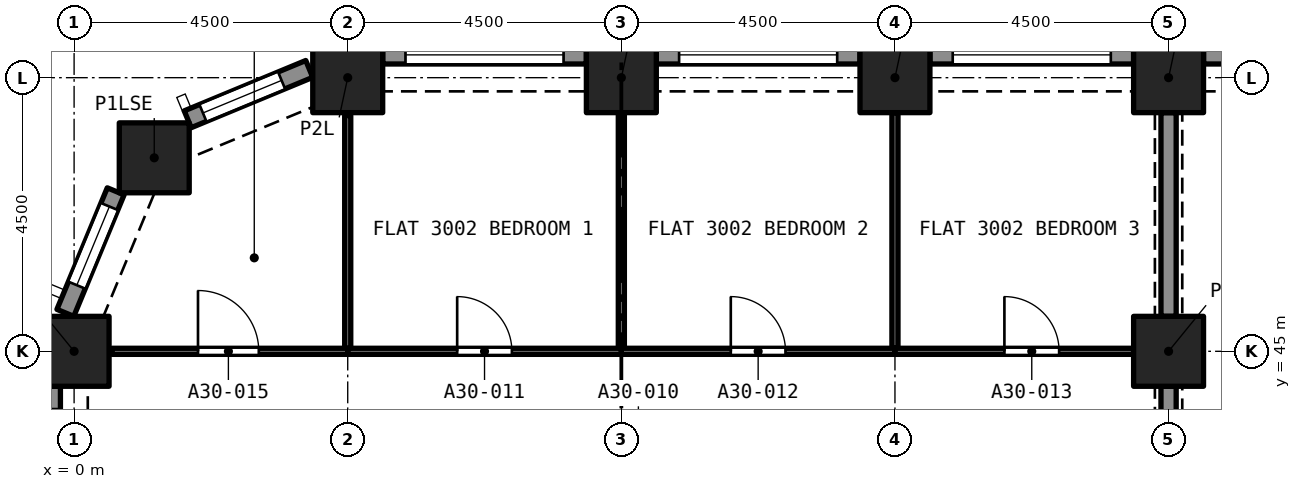
"""IFC4 building model, lengths in metres.
Left out: names, types, materials, properties, quantities, classifications, styles, units other than length and angle.
Written with IfcOpenShell. Run it as: python <this file> out.ifc"""

import sys

from ifc_helpers import new_model, si_unit, direction, frame, frame_2d, origin, origin_2d, place, context, subcontext, project, spatial, rectangle, extrude, element, fill, save


model = new_model("IFC4")
c1 = context("Model", 3, precision=1e-05, world=origin(), true_north=direction((0.0, 1.0)))
c2 = subcontext(c1, "Body", "Model", "MODEL_VIEW")
j1 = project(units=[si_unit("LENGTHUNIT", "METRE"), si_unit("PLANEANGLEUNIT", "RADIAN")], contexts=[c1])
p1 = place(None, origin())
s1 = spatial("IfcSite", under=j1, at=p1, CompositionType="ELEMENT")
p2 = place(p1, origin())
s2 = spatial("IfcBuilding", under=s1, at=p2, CompositionType="ELEMENT")
p3 = place(p2, frame((0.0, 0.0, 108.8)))
s3 = spatial("IfcBuildingStorey", under=s2, at=p3, CompositionType="ELEMENT", Elevation=108.8)
for number, where, z_axis, x_axis in (
    (1, (0.0, 45.0, 0.0), (0.0, 0.0, 1.0), (1.0, 0.0, 0.0)),
    (2, (18.0, 45.0, 0.0), (0.0, 0.0, 1.0), (1.0, 0.0, 0.0)),
    (3, (1.318, 48.182, 0.0), (0.0, 0.0, 1.0), (1.0, 0.0, 0.0)),
    (4, (4.5, 49.5, 0.0), (0.0, 0.0, 1.0), (1.0, 0.0, 0.0)),
    (5, (9.0, 49.5, 0.0), (0.0, 0.0, 1.0), (1.0, 0.0, 0.0)),
    (6, (13.5, 49.5, 0.0), (0.0, 0.0, 1.0), (1.0, 0.0, 0.0)),
    (7, (18.0, 49.5, 0.0), (0.0, 0.0, 1.0), (1.0, 0.0, 0.0)),
):
    element("IfcColumn", number, at=place(p3, frame(where, z_axis=z_axis, x_axis=x_axis)), inside=s3, PredefinedType="COLUMN", context=c2, shape_type="SweptSolid", body=[
        extrude(rectangle(XDim=1.15, YDim=1.15, at=origin_2d()), origin(), (0.0, 0.0, 1.0), 3.2),
    ])
p4 = place(p3, frame((18.575, 49.875, 0.0), z_axis=(0.0, 0.0, 1.0), x_axis=(1.0, 0.0, 0.0)))
e8 = element("IfcWall", 8, at=p4, inside=s3, PredefinedType="SOLIDWALL", context=c2, shape_type="SweptSolid", body=[
    extrude(rectangle(XDim=3.35, YDim=0.3, at=frame_2d((1.675, 0.0))), origin(), (0.0, 0.0, 1.0), 3.2),
])
p5 = place(p4, frame((0.375, 0.0, 0.45)))
e9 = element("IfcOpeningElement", 9, at=p5, cuts=e8, PredefinedType="OPENING", context=c2, shape_type="SweptSolid", body=[
    extrude(rectangle(XDim=2.6, YDim=1.95, at=frame_2d((1.3, 0.975))), frame((0.0, 0.16, 0.0), z_axis=(0.0, -1.0, 0.0), x_axis=(1.0, 0.0, 0.0)), (0.0, 0.0, 1.0), 0.32),
])
p6 = place(p3, frame((14.075, 49.875, 0.0), z_axis=(0.0, 0.0, 1.0), x_axis=(1.0, 0.0, 0.0)))
e10 = element("IfcWall", 10, at=p6, inside=s3, PredefinedType="SOLIDWALL", context=c2, shape_type="SweptSolid", body=[
    extrude(rectangle(XDim=3.35, YDim=0.3, at=frame_2d((1.675, 0.0))), origin(), (0.0, 0.0, 1.0), 3.2),
])
p7 = place(p6, frame((0.375, 0.0, 0.45)))
e11 = element("IfcOpeningElement", 11, at=p7, cuts=e10, PredefinedType="OPENING", context=c2, shape_type="SweptSolid", body=[
    extrude(rectangle(XDim=2.6, YDim=1.95, at=frame_2d((1.3, 0.975))), frame((0.0, 0.16, 0.0), z_axis=(0.0, -1.0, 0.0), x_axis=(1.0, 0.0, 0.0)), (0.0, 0.0, 1.0), 0.32),
])
p8 = place(p3, frame((9.575, 49.875, 0.0), z_axis=(0.0, 0.0, 1.0), x_axis=(1.0, 0.0, 0.0)))
e12 = element("IfcWall", 12, at=p8, inside=s3, PredefinedType="SOLIDWALL", context=c2, shape_type="SweptSolid", body=[
    extrude(rectangle(XDim=3.35, YDim=0.3, at=frame_2d((1.675, 0.0))), origin(), (0.0, 0.0, 1.0), 3.2),
])
p9 = place(p8, frame((0.375, 0.0, 0.45)))
e13 = element("IfcOpeningElement", 13, at=p9, cuts=e12, PredefinedType="OPENING", context=c2, shape_type="SweptSolid", body=[
    extrude(rectangle(XDim=2.6, YDim=1.95, at=frame_2d((1.3, 0.975))), frame((0.0, 0.16, 0.0), z_axis=(0.0, -1.0, 0.0), x_axis=(1.0, 0.0, 0.0)), (0.0, 0.0, 1.0), 0.32),
])
p10 = place(p3, frame((5.075, 49.875, 0.0), z_axis=(0.0, 0.0, 1.0), x_axis=(1.0, 0.0, 0.0)))
e14 = element("IfcWall", 14, at=p10, inside=s3, PredefinedType="SOLIDWALL", context=c2, shape_type="SweptSolid", body=[
    extrude(rectangle(XDim=3.35, YDim=0.3, at=frame_2d((1.675, 0.0))), origin(), (0.0, 0.0, 1.0), 3.2),
])
p11 = place(p10, frame((0.375, 0.0, 0.45)))
e15 = element("IfcOpeningElement", 15, at=p11, cuts=e14, PredefinedType="OPENING", context=c2, shape_type="SweptSolid", body=[
    extrude(rectangle(XDim=2.6, YDim=1.95, at=frame_2d((1.3, 0.975))), frame((0.0, 0.16, 0.0), z_axis=(0.0, -1.0, 0.0), x_axis=(1.0, 0.0, 0.0)), (0.0, 0.0, 1.0), 0.32),
])
p12 = place(p3, frame((1.869, 48.816, 0.0), z_axis=(0.0, 0.0, 1.0), x_axis=(0.923862802911, 0.382723818695, 0.0)))
e16 = element("IfcWall", 16, at=p12, inside=s3, PredefinedType="SOLIDWALL", context=c2, shape_type="SweptSolid", body=[
    extrude(rectangle(XDim=2.164, YDim=0.3, at=frame_2d((1.082, 0.0))), origin(), (0.0, 0.0, 1.0), 3.2),
])
p13 = place(p12, frame((0.271, 0.0, 0.45)))
e17 = element("IfcOpeningElement", 17, at=p13, cuts=e16, PredefinedType="OPENING", context=c2, shape_type="SweptSolid", body=[
    extrude(rectangle(XDim=1.4, YDim=1.95, at=frame_2d((0.7, 0.975))), frame((0.0, 0.16, 0.0), z_axis=(0.0, -1.0, 0.0), x_axis=(1.0, 0.0, 0.0)), (0.0, 0.0, 1.0), 0.32),
])
p14 = place(p3, frame((-0.144, 45.632, 0.0), z_axis=(0.0, 0.0, 1.0), x_axis=(0.382723818695, 0.923862802911, 0.0)))
e18 = element("IfcWall", 18, at=p14, inside=s3, PredefinedType="SOLIDWALL", context=c2, shape_type="SweptSolid", body=[
    extrude(rectangle(XDim=2.164, YDim=0.3, at=frame_2d((1.082, 0.0))), origin(), (0.0, 0.0, 1.0), 3.2),
])
p15 = place(p14, frame((0.493, 0.0, 0.45)))
e19 = element("IfcOpeningElement", 19, at=p15, cuts=e18, PredefinedType="OPENING", context=c2, shape_type="SweptSolid", body=[
    extrude(rectangle(XDim=1.4, YDim=1.95, at=frame_2d((0.7, 0.975))), frame((0.0, 0.16, 0.0), z_axis=(0.0, -1.0, 0.0), x_axis=(1.0, 0.0, 0.0)), (0.0, 0.0, 1.0), 0.32),
])
p16 = place(p3, frame((-0.375, 41.075, 0.0), z_axis=(0.0, 0.0, 1.0), x_axis=(0.0, 1.0, 0.0)))
e20 = element("IfcWall", 20, at=p16, inside=s3, PredefinedType="SOLIDWALL", context=c2, shape_type="SweptSolid", body=[
    extrude(rectangle(XDim=3.35, YDim=0.3, at=frame_2d((1.675, 0.0))), origin(), (0.0, 0.0, 1.0), 3.2),
])
p17 = place(p16, frame((0.375, 0.0, 0.45)))
e21 = element("IfcOpeningElement", 21, at=p17, cuts=e20, PredefinedType="OPENING", context=c2, shape_type="SweptSolid", body=[
    extrude(rectangle(XDim=2.6, YDim=1.95, at=frame_2d((1.3, 0.975))), frame((0.0, 0.16, 0.0), z_axis=(0.0, -1.0, 0.0), x_axis=(1.0, 0.0, 0.0)), (0.0, 0.0, 1.0), 0.32),
])
p18 = place(p3, frame((9.0, 45.05, 0.0), z_axis=(0.0, 0.0, 1.0), x_axis=(0.0, 1.0, 0.0)))
e22 = element("IfcWall", 22, at=p18, inside=s3, PredefinedType="PARTITIONING", context=c2, shape_type="SweptSolid", body=[
    extrude(rectangle(XDim=3.875, YDim=0.1, at=frame_2d((1.938, 0.0))), origin(), (0.0, 0.0, 1.0), 2.9),
])
p19 = place(p3, frame((4.5, 45.0, 0.0), z_axis=(0.0, 0.0, 1.0), x_axis=(1.0, 0.0, 0.0)))
e23 = element("IfcWall", 23, at=p19, inside=s3, PredefinedType="PARTITIONING", context=c2, shape_type="SweptSolid", body=[
    extrude(rectangle(XDim=4.5, YDim=0.1, at=frame_2d((2.25, 0.0))), origin(), (0.0, 0.0, 1.0), 2.9),
])
p20 = place(p19, frame((1.8, 0.0, 0.0)))
e24 = element("IfcOpeningElement", 24, at=p20, cuts=e23, PredefinedType="OPENING", context=c2, shape_type="SweptSolid", body=[
    extrude(rectangle(XDim=0.9, YDim=2.1, at=frame_2d((0.45, 1.05))), frame((0.0, 0.06, 0.0), z_axis=(0.0, -1.0, 0.0), x_axis=(1.0, 0.0, 0.0)), (0.0, 0.0, 1.0), 0.12),
])
p21 = place(p3, frame((4.5, 45.05, 0.0), z_axis=(0.0, 0.0, 1.0), x_axis=(0.0, 1.0, 0.0)))
e25 = element("IfcWall", 25, at=p21, inside=s3, PredefinedType="PARTITIONING", context=c2, shape_type="SweptSolid", body=[
    extrude(rectangle(XDim=3.828, YDim=0.1, at=frame_2d((1.914, 0.0))), origin(), (0.0, 0.0, 1.0), 2.9),
])
p22 = place(p3, frame((13.5, 45.05, 0.0), z_axis=(0.0, 0.0, 1.0), x_axis=(0.0, 1.0, 0.0)))
e26 = element("IfcWall", 26, at=p22, inside=s3, PredefinedType="PARTITIONING", context=c2, shape_type="SweptSolid", body=[
    extrude(rectangle(XDim=3.875, YDim=0.1, at=frame_2d((1.938, 0.0))), origin(), (0.0, 0.0, 1.0), 2.9),
])
p23 = place(p3, frame((9.0, 45.0, 0.0), z_axis=(0.0, 0.0, 1.0), x_axis=(1.0, 0.0, 0.0)))
e27 = element("IfcWall", 27, at=p23, inside=s3, PredefinedType="PARTITIONING", context=c2, shape_type="SweptSolid", body=[
    extrude(rectangle(XDim=4.5, YDim=0.1, at=frame_2d((2.25, 0.0))), origin(), (0.0, 0.0, 1.0), 2.9),
])
p24 = place(p23, frame((1.8, 0.0, 0.0)))
e28 = element("IfcOpeningElement", 28, at=p24, cuts=e27, PredefinedType="OPENING", context=c2, shape_type="SweptSolid", body=[
    extrude(rectangle(XDim=0.9, YDim=2.1, at=frame_2d((0.45, 1.05))), frame((0.0, 0.06, 0.0), z_axis=(0.0, -1.0, 0.0), x_axis=(1.0, 0.0, 0.0)), (0.0, 0.0, 1.0), 0.12),
])
p25 = place(p3, frame((13.5, 45.0, 0.0), z_axis=(0.0, 0.0, 1.0), x_axis=(1.0, 0.0, 0.0)))
e29 = element("IfcWall", 29, at=p25, inside=s3, PredefinedType="PARTITIONING", context=c2, shape_type="SweptSolid", body=[
    extrude(rectangle(XDim=3.925, YDim=0.1, at=frame_2d((1.962, 0.0))), origin(), (0.0, 0.0, 1.0), 2.9),
])
p26 = place(p25, frame((1.8, 0.0, 0.0)))
e30 = element("IfcOpeningElement", 30, at=p26, cuts=e29, PredefinedType="OPENING", context=c2, shape_type="SweptSolid", body=[
    extrude(rectangle(XDim=0.9, YDim=2.1, at=frame_2d((0.45, 1.05))), frame((0.0, 0.06, 0.0), z_axis=(0.0, -1.0, 0.0), x_axis=(1.0, 0.0, 0.0)), (0.0, 0.0, 1.0), 0.12),
])
p27 = place(p3, frame((18.0, 45.575, 0.0), z_axis=(0.0, 0.0, 1.0), x_axis=(0.0, 1.0, 0.0)))
e31 = element("IfcWall", 31, at=p27, inside=s3, PredefinedType="PARTITIONING", context=c2, shape_type="SweptSolid", body=[
    extrude(rectangle(XDim=3.35, YDim=0.25, at=frame_2d((1.675, 0.0))), origin(), (0.0, 0.0, 1.0), 2.38),
])
p28 = place(p3, frame((0.622, 45.0, 0.0), z_axis=(0.0, 0.0, 1.0), x_axis=(1.0, 0.0, 0.0)))
e32 = element("IfcWall", 32, at=p28, inside=s3, PredefinedType="PARTITIONING", context=c2, shape_type="SweptSolid", body=[
    extrude(rectangle(XDim=3.878, YDim=0.1, at=frame_2d((1.939, 0.0))), origin(), (0.0, 0.0, 1.0), 2.9),
])
p29 = place(p28, frame((1.415, 0.0, 0.0)))
e33 = element("IfcOpeningElement", 33, at=p29, cuts=e32, PredefinedType="OPENING", context=c2, shape_type="SweptSolid", body=[
    extrude(rectangle(XDim=1.0, YDim=2.1, at=frame_2d((0.5, 1.05))), frame((0.0, 0.06, 0.0), z_axis=(0.0, -1.0, 0.0), x_axis=(1.0, 0.0, 0.0)), (0.0, 0.0, 1.0), 0.12),
])
p30 = place(p3, frame((18.0, 41.075, 0.0), z_axis=(0.0, 0.0, 1.0), x_axis=(0.0, 1.0, 0.0)))
e34 = element("IfcWall", 34, at=p30, inside=s3, PredefinedType="PARTITIONING", context=c2, shape_type="SweptSolid", body=[
    extrude(rectangle(XDim=3.35, YDim=0.25, at=frame_2d((1.675, 0.0))), origin(), (0.0, 0.0, 1.0), 2.38),
])
p31 = place(p7, origin())
e35 = element("IfcWindow", 35, at=p31, inside=s3, PartitioningType="SINGLE_PANEL", PredefinedType="WINDOW", context=c2, shape_type="SweptSolid", body=[
    extrude(rectangle(XDim=2.6, YDim=1.95, at=frame_2d((1.3, 0.975))), frame((0.0, 0.03, 0.0), z_axis=(0.0, -1.0, 0.0), x_axis=(1.0, 0.0, 0.0)), (0.0, 0.0, 1.0), 0.06),
])
fill(e11, e35)
p32 = place(p9, origin())
e36 = element("IfcWindow", 36, at=p32, inside=s3, PartitioningType="SINGLE_PANEL", PredefinedType="WINDOW", context=c2, shape_type="SweptSolid", body=[
    extrude(rectangle(XDim=2.6, YDim=1.95, at=frame_2d((1.3, 0.975))), frame((0.0, 0.03, 0.0), z_axis=(0.0, -1.0, 0.0), x_axis=(1.0, 0.0, 0.0)), (0.0, 0.0, 1.0), 0.06),
])
fill(e13, e36)
p33 = place(p11, origin())
e37 = element("IfcWindow", 37, at=p33, inside=s3, PartitioningType="SINGLE_PANEL", PredefinedType="WINDOW", context=c2, shape_type="SweptSolid", body=[
    extrude(rectangle(XDim=2.6, YDim=1.95, at=frame_2d((1.3, 0.975))), frame((0.0, 0.03, 0.0), z_axis=(0.0, -1.0, 0.0), x_axis=(1.0, 0.0, 0.0)), (0.0, 0.0, 1.0), 0.06),
])
fill(e15, e37)
p34 = place(p13, origin())
e38 = element("IfcWindow", 38, at=p34, inside=s3, PartitioningType="SINGLE_PANEL", PredefinedType="WINDOW", context=c2, shape_type="SweptSolid", body=[
    extrude(rectangle(XDim=1.4, YDim=1.95, at=frame_2d((0.7, 0.975))), frame((0.0, 0.03, 0.0), z_axis=(0.0, -1.0, 0.0), x_axis=(1.0, 0.0, 0.0)), (0.0, 0.0, 1.0), 0.06),
])
fill(e17, e38)
p35 = place(p15, origin())
e39 = element("IfcWindow", 39, at=p35, inside=s3, PartitioningType="SINGLE_PANEL", PredefinedType="WINDOW", context=c2, shape_type="SweptSolid", body=[
    extrude(rectangle(XDim=1.4, YDim=1.95, at=frame_2d((0.7, 0.975))), frame((0.0, 0.03, 0.0), z_axis=(0.0, -1.0, 0.0), x_axis=(1.0, 0.0, 0.0)), (0.0, 0.0, 1.0), 0.06),
])
fill(e19, e39)
p36 = place(p20, origin())
e40 = element("IfcDoor", 40, at=p36, inside=s3, OperationType="SINGLE_SWING_RIGHT", PredefinedType="DOOR", context=c2, shape_type="SweptSolid", body=[
    extrude(rectangle(XDim=0.9, YDim=2.1, at=frame_2d((0.45, 1.05))), frame((0.0, 0.025, 0.0), z_axis=(0.0, -1.0, 0.0), x_axis=(1.0, 0.0, 0.0)), (0.0, 0.0, 1.0), 0.05),
])
fill(e24, e40)
p37 = place(p24, origin())
e41 = element("IfcDoor", 41, at=p37, inside=s3, OperationType="SINGLE_SWING_LEFT", PredefinedType="DOOR", context=c2, shape_type="SweptSolid", body=[
    extrude(rectangle(XDim=0.9, YDim=2.1, at=frame_2d((0.45, 1.05))), frame((0.0, 0.025, 0.0), z_axis=(0.0, -1.0, 0.0), x_axis=(1.0, 0.0, 0.0)), (0.0, 0.0, 1.0), 0.05),
])
fill(e28, e41)
p38 = place(p26, origin())
e42 = element("IfcDoor", 42, at=p38, inside=s3, OperationType="SINGLE_SWING_RIGHT", PredefinedType="DOOR", context=c2, shape_type="SweptSolid", body=[
    extrude(rectangle(XDim=0.9, YDim=2.1, at=frame_2d((0.45, 1.05))), frame((0.0, 0.025, 0.0), z_axis=(0.0, -1.0, 0.0), x_axis=(1.0, 0.0, 0.0)), (0.0, 0.0, 1.0), 0.05),
])
fill(e30, e42)
p39 = place(p29, origin())
e43 = element("IfcDoor", 43, at=p39, inside=s3, OperationType="SINGLE_SWING_LEFT", PredefinedType="DOOR", context=c2, shape_type="SweptSolid", body=[
    extrude(rectangle(XDim=1.0, YDim=2.1, at=frame_2d((0.5, 1.05))), frame((0.0, 0.025, 0.0), z_axis=(0.0, -1.0, 0.0), x_axis=(1.0, 0.0, 0.0)), (0.0, 0.0, 1.0), 0.05),
])
fill(e33, e43)
save(model, sys.argv[1])
